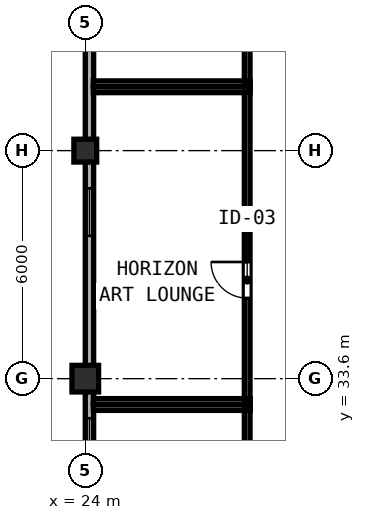
"""IFC4 building model, lengths in metres.
Left out: names, types, materials, properties, quantities, classifications, styles, units other than length and angle.
Written with IfcOpenShell. Run it as: python <this file> out.ifc"""

import sys

from ifc_helpers import new_model, si_unit, direction, frame, frame_2d, origin, origin_2d, place, context, subcontext, project, spatial, rectangle, hollow_rectangle, extrude, element, fill, save


model = new_model("IFC4")
c1 = context("Model", 3, precision=1e-05, world=origin(), true_north=direction((0.0, 1.0)))
c2 = subcontext(c1, "Body", "Model", "MODEL_VIEW")
j1 = project(units=[si_unit("LENGTHUNIT", "METRE"), si_unit("PLANEANGLEUNIT", "RADIAN")], contexts=[c1])
p1 = place(None, origin())
s1 = spatial("IfcSite", under=j1, at=p1, CompositionType="ELEMENT")
p2 = place(p1, origin())
s2 = spatial("IfcBuilding", under=s1, at=p2, CompositionType="ELEMENT")
p3 = place(p2, frame((0.0, 0.0, 286.1)))
s3 = spatial("IfcBuildingStorey", under=s2, at=p3, CompositionType="ELEMENT", Elevation=286.1)
p4 = place(p3, frame((24.0, 33.6, 0.0), z_axis=(0.0, 0.0, 1.0), x_axis=(1.0, 0.0, 0.0)))
e1 = element("IfcColumn", 1, at=p4, inside=s3, PredefinedType="COLUMN", context=c2, shape_type="SweptSolid", body=[
    extrude(hollow_rectangle(XDim=0.7, YDim=0.7, WallThickness=0.026, at=origin_2d()), origin(), (0.0, 0.0, 1.0), 3.9),
])
p5 = place(p3, frame((24.0, 39.6, 0.0), z_axis=(0.0, 0.0, 1.0), x_axis=(1.0, 0.0, 0.0)))
e2 = element("IfcColumn", 2, at=p5, inside=s3, PredefinedType="COLUMN", context=c2, shape_type="SweptSolid", body=[
    extrude(hollow_rectangle(XDim=0.6, YDim=0.6, WallThickness=0.024, at=origin_2d()), origin(), (0.0, 0.0, 1.0), 3.9),
])
p6 = place(p3, frame((24.11, 45.258, 0.0), z_axis=(0.0, 0.0, 1.0), x_axis=(0.0, -1.0, 0.0)))
e3 = element("IfcWall", 3, at=p6, inside=s3, PredefinedType="SOLIDWALL", context=c2, shape_type="SweptSolid", body=[
    extrude(rectangle(XDim=5.366, YDim=0.22, at=frame_2d((2.683, 0.0))), origin(), (0.0, 0.0, 1.0), 3.365),
])
p7 = place(p6, frame((0.7, 0.0, 0.85)))
e4 = element("IfcOpeningElement", 4, at=p7, cuts=e3, PredefinedType="OPENING", context=c2, shape_type="SweptSolid", body=[
    extrude(rectangle(XDim=1.25, YDim=1.95, at=frame_2d((0.625, 0.975))), frame((0.0, 0.12, 0.0), z_axis=(0.0, -1.0, 0.0), x_axis=(1.0, 0.0, 0.0)), (0.0, 0.0, 1.0), 0.24),
])
p8 = place(p3, frame((24.11, 39.308, 0.0), z_axis=(0.0, 0.0, 1.0), x_axis=(0.0, -1.0, 0.0)))
e5 = element("IfcWall", 5, at=p8, inside=s3, PredefinedType="SOLIDWALL", context=c2, shape_type="SweptSolid", body=[
    extrude(rectangle(XDim=5.366, YDim=0.22, at=frame_2d((2.683, 0.0))), origin(), (0.0, 0.0, 1.0), 3.365),
])
p9 = place(p8, frame((0.7, 0.0, 0.85)))
e6 = element("IfcOpeningElement", 6, at=p9, cuts=e5, PredefinedType="OPENING", context=c2, shape_type="SweptSolid", body=[
    extrude(rectangle(XDim=1.25, YDim=1.95, at=frame_2d((0.625, 0.975))), frame((0.0, 0.12, 0.0), z_axis=(0.0, -1.0, 0.0), x_axis=(1.0, 0.0, 0.0)), (0.0, 0.0, 1.0), 0.24),
])
p10 = place(p3, frame((24.11, 33.258, 0.0), z_axis=(0.0, 0.0, 1.0), x_axis=(0.0, -1.0, 0.0)))
e7 = element("IfcWall", 7, at=p10, inside=s3, PredefinedType="SOLIDWALL", context=c2, shape_type="SweptSolid", body=[
    extrude(rectangle(XDim=5.366, YDim=0.22, at=frame_2d((2.683, 0.0))), origin(), (0.0, 0.0, 1.0), 3.365),
])
p11 = place(p10, frame((0.7, 0.0, 0.85)))
e8 = element("IfcOpeningElement", 8, at=p11, cuts=e7, PredefinedType="OPENING", context=c2, shape_type="SweptSolid", body=[
    extrude(rectangle(XDim=1.25, YDim=1.95, at=frame_2d((0.625, 0.975))), frame((0.0, 0.12, 0.0), z_axis=(0.0, -1.0, 0.0), x_axis=(1.0, 0.0, 0.0)), (0.0, 0.0, 1.0), 0.24),
])
for number, where, z_axis, x_axis in (
    (9, (24.212, 41.2, 0.0), (0.0, 0.0, 1.0), (1.0, 0.0, 0.0)),
    (10, (24.212, 33.0, 0.0), (0.0, 0.0, 1.0), (1.0, 0.0, 0.0)),
):
    element("IfcWall", number, at=place(p3, frame(where, z_axis=z_axis, x_axis=x_axis)), inside=s3, PredefinedType="PARTITIONING", context=c2, shape_type="SweptSolid", body=[
        extrude(rectangle(XDim=4.128, YDim=0.15, at=frame_2d((2.064, 0.0))), origin(), (0.0, 0.0, 1.0), 3.72),
    ])
p12 = place(p3, frame((28.26, 33.06, 0.0), z_axis=(0.0, 0.0, 1.0), x_axis=(0.0, 1.0, 0.0)))
e11 = element("IfcWall", 11, at=p12, inside=s3, PredefinedType="PARTITIONING", context=c2, shape_type="SweptSolid", body=[
    extrude(rectangle(XDim=8.08, YDim=0.15, at=frame_2d((4.04, 0.0))), origin(), (0.0, 0.0, 1.0), 3.72),
])
p13 = place(p12, frame((3.61, 0.0, 0.0), z_axis=(0.0, 0.0, 1.0), x_axis=(-1.0, 0.0, 0.0)))
e12 = element("IfcOpeningElement", 12, at=p13, cuts=e11, PredefinedType="OPENING", context=c2, shape_type="SweptSolid", body=[
    extrude(rectangle(XDim=0.95, YDim=2.12, at=frame_2d((0.475, 1.06))), frame((0.0, 0.085, 0.0), z_axis=(0.0, -1.0, 0.0), x_axis=(1.0, 0.0, 0.0)), (0.0, 0.0, 1.0), 0.17),
])
p14 = place(p3, frame((24.212, 41.36, 0.0), z_axis=(0.0, 0.0, 1.0), x_axis=(1.0, 0.0, 0.0)))
e13 = element("IfcWall", 13, at=p14, inside=s3, PredefinedType="PARTITIONING", context=c2, shape_type="SweptSolid", body=[
    extrude(rectangle(XDim=4.128, YDim=0.15, at=frame_2d((2.064, 0.0))), origin(), (0.0, 0.0, 1.0), 3.72),
])
p15 = place(p3, frame((28.26, 41.42, 0.0), z_axis=(0.0, 0.0, 1.0), x_axis=(0.0, 1.0, 0.0)))
e14 = element("IfcWall", 14, at=p15, inside=s3, PredefinedType="PARTITIONING", context=c2, shape_type="SweptSolid", body=[
    extrude(rectangle(XDim=4.54, YDim=0.15, at=frame_2d((2.27, 0.0))), origin(), (0.0, 0.0, 1.0), 3.72),
])
p16 = place(p15, frame((2.11, 0.0, 0.0), z_axis=(0.0, 0.0, 1.0), x_axis=(-1.0, 0.0, 0.0)))
e15 = element("IfcOpeningElement", 15, at=p16, cuts=e14, PredefinedType="OPENING", context=c2, shape_type="SweptSolid", body=[
    extrude(rectangle(XDim=0.95, YDim=2.12, at=frame_2d((0.475, 1.06))), frame((0.0, 0.085, 0.0), z_axis=(0.0, -1.0, 0.0), x_axis=(1.0, 0.0, 0.0)), (0.0, 0.0, 1.0), 0.17),
])
p17 = place(p3, frame((24.212, 32.84, 0.0), z_axis=(0.0, 0.0, 1.0), x_axis=(1.0, 0.0, 0.0)))
e16 = element("IfcWall", 16, at=p17, inside=s3, PredefinedType="PARTITIONING", context=c2, shape_type="SweptSolid", body=[
    extrude(rectangle(XDim=4.128, YDim=0.15, at=frame_2d((2.064, 0.0))), origin(), (0.0, 0.0, 1.0), 3.72),
])
p18 = place(p3, frame((28.26, 27.91, 0.0), z_axis=(0.0, 0.0, 1.0), x_axis=(0.0, 1.0, 0.0)))
e17 = element("IfcWall", 17, at=p18, inside=s3, PredefinedType="PARTITIONING", context=c2, shape_type="SweptSolid", body=[
    extrude(rectangle(XDim=4.87, YDim=0.15, at=frame_2d((2.435, 0.0))), origin(), (0.0, 0.0, 1.0), 3.72),
])
p19 = place(p18, frame((1.81, 0.0, 0.0), z_axis=(0.0, 0.0, 1.0), x_axis=(-1.0, 0.0, 0.0)))
e18 = element("IfcOpeningElement", 18, at=p19, cuts=e17, PredefinedType="OPENING", context=c2, shape_type="SweptSolid", body=[
    extrude(rectangle(XDim=0.95, YDim=2.12, at=frame_2d((0.475, 1.06))), frame((0.0, 0.085, 0.0), z_axis=(0.0, -1.0, 0.0), x_axis=(1.0, 0.0, 0.0)), (0.0, 0.0, 1.0), 0.17),
])
p20 = place(p9, origin())
e19 = element("IfcWindow", 19, at=p20, inside=s3, PartitioningType="SINGLE_PANEL", PredefinedType="WINDOW", context=c2, shape_type="SweptSolid", body=[
    extrude(rectangle(XDim=1.25, YDim=1.95, at=frame_2d((0.625, 0.975))), frame((0.0, 0.03, 0.0), z_axis=(0.0, -1.0, 0.0), x_axis=(1.0, 0.0, 0.0)), (0.0, 0.0, 1.0), 0.06),
])
fill(e6, e19)
p21 = place(p11, origin())
e20 = element("IfcWindow", 20, at=p21, inside=s3, PartitioningType="SINGLE_PANEL", PredefinedType="WINDOW", context=c2, shape_type="SweptSolid", body=[
    extrude(rectangle(XDim=1.25, YDim=1.95, at=frame_2d((0.625, 0.975))), frame((0.0, 0.03, 0.0), z_axis=(0.0, -1.0, 0.0), x_axis=(1.0, 0.0, 0.0)), (0.0, 0.0, 1.0), 0.06),
])
fill(e8, e20)
p22 = place(p13, origin())
e21 = element("IfcDoor", 21, at=p22, inside=s3, OperationType="SINGLE_SWING_LEFT", PredefinedType="DOOR", context=c2, shape_type="SweptSolid", body=[
    extrude(rectangle(XDim=0.95, YDim=2.12, at=frame_2d((0.475, 1.06))), frame((0.0, 0.025, 0.0), z_axis=(0.0, -1.0, 0.0), x_axis=(1.0, 0.0, 0.0)), (0.0, 0.0, 1.0), 0.05),
])
fill(e12, e21)
save(model, sys.argv[1])
